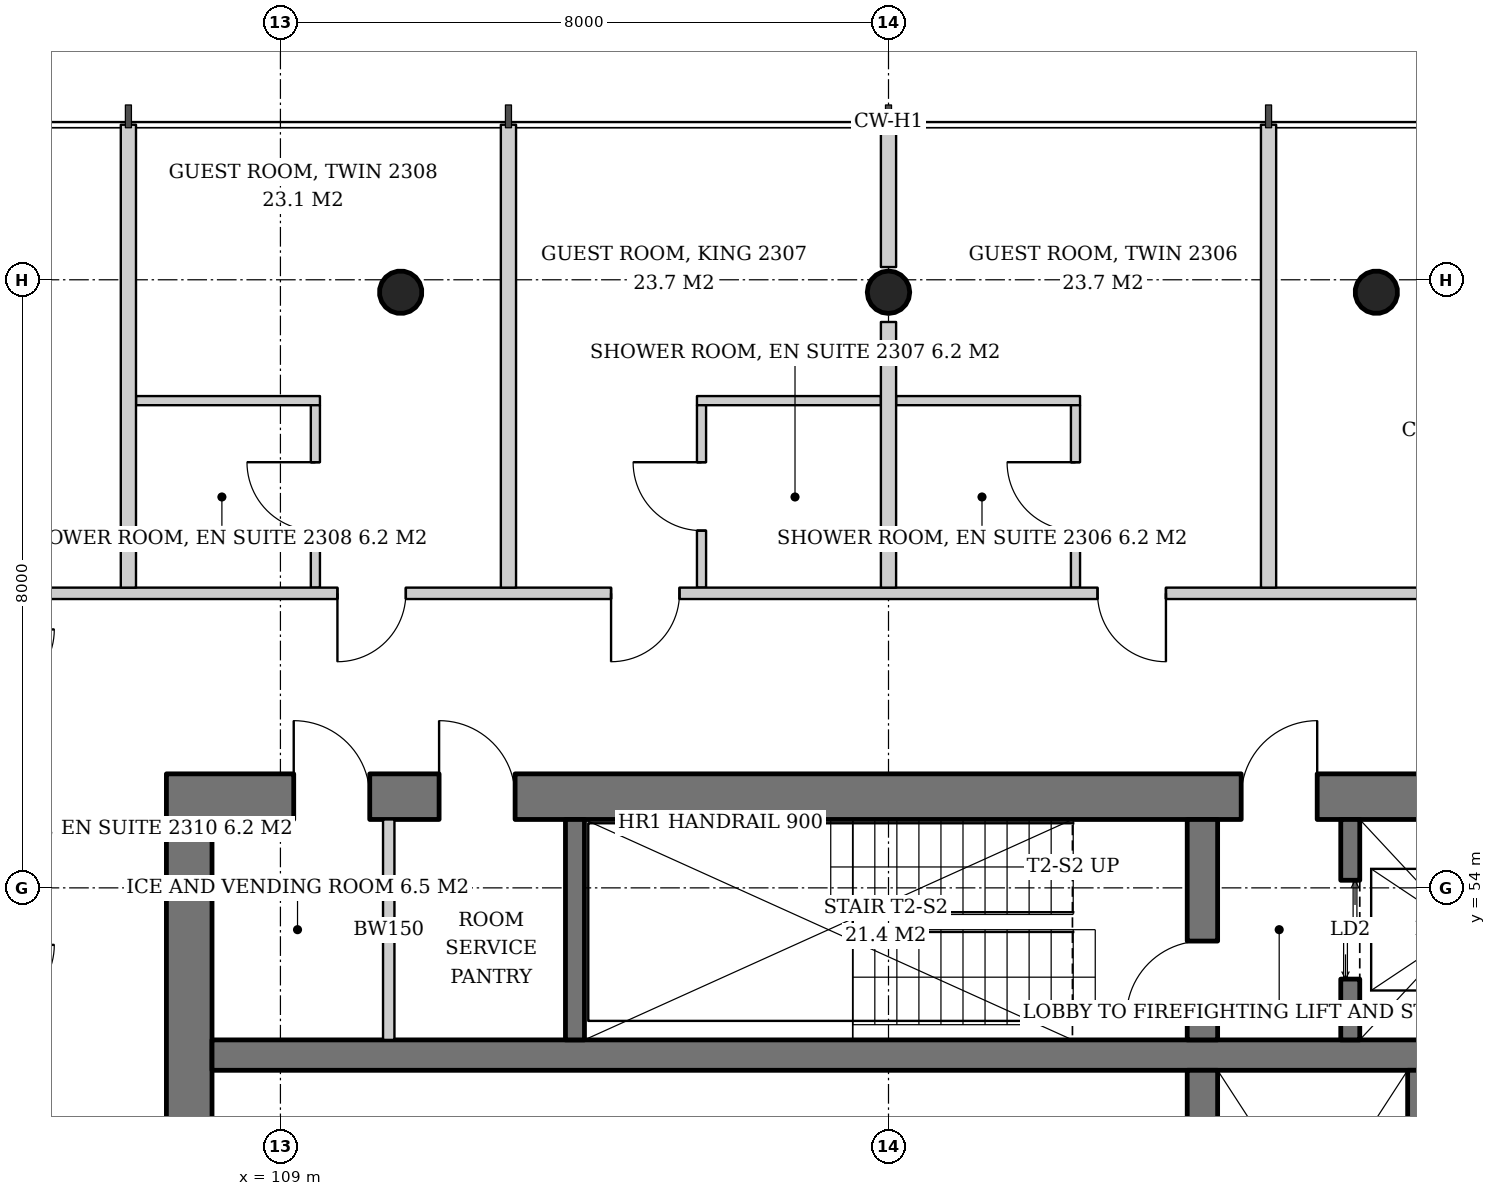
"""IFC4 building model, lengths in metres.
Left out: names, types, materials, properties, quantities, classifications, styles, units other than length and angle.
Written with IfcOpenShell. Run it as: python <this file> out.ifc"""

import sys

from ifc_helpers import new_model, si_unit, direction, frame, frame_2d, origin, origin_2d, place, context, subcontext, project, spatial, rectangle, hollow_circle, extrude, element, fill, save


model = new_model("IFC4")
c1 = context("Model", 3, precision=1e-05, world=origin(), true_north=direction((0.0, 1.0)))
c2 = subcontext(c1, "Body", "Model", "MODEL_VIEW")
j1 = project(units=[si_unit("LENGTHUNIT", "METRE"), si_unit("PLANEANGLEUNIT", "RADIAN")], contexts=[c1])
p1 = place(None, origin())
s1 = spatial("IfcSite", under=j1, at=p1, CompositionType="ELEMENT")
p2 = place(p1, origin())
s2 = spatial("IfcBuilding", under=s1, at=p2, CompositionType="ELEMENT")
p3 = place(p2, frame((0.0, 0.0, 93.2)))
s3 = spatial("IfcBuildingStorey", under=s2, at=p3, CompositionType="ELEMENT", Elevation=93.2)
p4 = place(p3, frame((123.444, 61.888, 0.0), z_axis=(-0.021497706284, -0.043059584825, 0.998841188968), x_axis=(0.894693706707, -0.446680166538, 0.0)))
e1 = element("IfcColumn", 1, at=p4, inside=s3, PredefinedType="COLUMN", context=c2, shape_type="SweptSolid", body=[
    extrude(hollow_circle(Radius=0.28, WallThickness=0.02, at=origin_2d()), origin(), (0.0, 0.0, 1.0), 3.804),
])
p5 = place(p3, frame((117.0, 61.888, 0.0), z_axis=(0.0, -0.043069538298, 0.999072076915), x_axis=(1.0, 0.0, 0.0)))
e2 = element("IfcColumn", 2, at=p5, inside=s3, PredefinedType="COLUMN", context=c2, shape_type="SweptSolid", body=[
    extrude(hollow_circle(Radius=0.28, WallThickness=0.02, at=origin_2d()), origin(), (0.0, 0.0, 1.0), 3.803),
])
p6 = place(p3, frame((110.556, 61.888, 0.0), z_axis=(0.021497706284, -0.043059584825, 0.998841188968), x_axis=(0.894693706707, 0.446680166538, 0.0)))
e3 = element("IfcColumn", 3, at=p6, inside=s3, PredefinedType="COLUMN", context=c2, shape_type="SweptSolid", body=[
    extrude(hollow_circle(Radius=0.28, WallThickness=0.02, at=origin_2d()), origin(), (0.0, 0.0, 1.0), 3.804),
])
p7 = place(p3, frame((107.5, 55.2, 0.0), z_axis=(0.0, 0.0, 1.0), x_axis=(1.0, 0.0, 0.0)))
e4 = element("IfcWall", 4, at=p7, inside=s3, PredefinedType="SHEAR", context=c2, shape_type="SweptSolid", body=[
    extrude(rectangle(XDim=19.0, YDim=0.6, at=frame_2d((9.5, 0.0))), origin(), (0.0, 0.0, 1.0), 3.8),
])
p8 = place(p7, frame((14.14, 0.0, 0.0)))
e5 = element("IfcOpeningElement", 5, at=p8, cuts=e4, PredefinedType="OPENING", context=c2, shape_type="SweptSolid", body=[
    extrude(rectangle(XDim=1.0, YDim=2.1, at=frame_2d((0.5, 1.05))), frame((0.0, 0.31, 0.0), z_axis=(0.0, -1.0, 0.0), x_axis=(1.0, 0.0, 0.0)), (0.0, 0.0, 1.0), 0.62),
])
p9 = place(p7, frame((1.675, 0.0, 0.0)))
e6 = element("IfcOpeningElement", 6, at=p9, cuts=e4, PredefinedType="OPENING", context=c2, shape_type="SweptSolid", body=[
    extrude(rectangle(XDim=1.0, YDim=2.1, at=frame_2d((0.5, 1.05))), frame((0.0, 0.31, 0.0), z_axis=(0.0, -1.0, 0.0), x_axis=(1.0, 0.0, 0.0)), (0.0, 0.0, 1.0), 0.62),
])
p10 = place(p7, frame((3.587, 0.0, 0.0)))
e7 = element("IfcOpeningElement", 7, at=p10, cuts=e4, PredefinedType="OPENING", context=c2, shape_type="SweptSolid", body=[
    extrude(rectangle(XDim=1.0, YDim=2.1, at=frame_2d((0.5, 1.05))), frame((0.0, 0.31, 0.0), z_axis=(0.0, -1.0, 0.0), x_axis=(1.0, 0.0, 0.0)), (0.0, 0.0, 1.0), 0.62),
])
p11 = place(p3, frame((107.8, 37.1, 0.0), z_axis=(0.0, 0.0, 1.0), x_axis=(0.0, 1.0, 0.0)))
e8 = element("IfcWall", 8, at=p11, inside=s3, PredefinedType="SHEAR", context=c2, shape_type="SweptSolid", body=[
    extrude(rectangle(XDim=17.8, YDim=0.6, at=frame_2d((8.9, 0.0))), origin(), (0.0, 0.0, 1.0), 3.8),
])
p12 = place(p11, frame((8.0, 0.0, 0.0)))
e9 = element("IfcOpeningElement", 9, at=p12, cuts=e8, PredefinedType="OPENING", context=c2, shape_type="SweptSolid", body=[
    extrude(rectangle(XDim=1.8, YDim=2.4, at=frame_2d((0.9, 1.2))), frame((0.0, 0.31, 0.0), z_axis=(0.0, -1.0, 0.0), x_axis=(1.0, 0.0, 0.0)), (0.0, 0.0, 1.0), 0.62),
])
p13 = place(p3, frame((108.1, 51.8, 0.0), z_axis=(0.0, 0.0, 1.0), x_axis=(1.0, 0.0, 0.0)))
e10 = element("IfcWall", 10, at=p13, inside=s3, PredefinedType="SHEAR", context=c2, shape_type="SweptSolid", body=[
    extrude(rectangle(XDim=17.8, YDim=0.4, at=frame_2d((8.9, 0.0))), origin(), (0.0, 0.0, 1.0), 3.8),
])
p14 = place(p3, frame((121.13, 40.4, 0.0), z_axis=(0.0, 0.0, 1.0), x_axis=(0.0, 1.0, 0.0)))
e11 = element("IfcWall", 11, at=p14, inside=s3, PredefinedType="SHEAR", context=c2, shape_type="SweptSolid", body=[
    extrude(rectangle(XDim=11.2, YDim=0.4, at=frame_2d((5.6, 0.0))), origin(), (0.0, 0.0, 1.0), 3.8),
])
p15 = place(p3, frame((121.13, 52.0, 0.0), z_axis=(0.0, 0.0, 1.0), x_axis=(0.0, 1.0, 0.0)))
e12 = element("IfcWall", 12, at=p15, inside=s3, PredefinedType="SHEAR", context=c2, shape_type="SweptSolid", body=[
    extrude(rectangle(XDim=2.9, YDim=0.4, at=frame_2d((1.45, 0.0))), origin(), (0.0, 0.0, 1.0), 3.8),
])
p16 = place(p15, frame((0.3, 0.0, 0.0)))
e13 = element("IfcOpeningElement", 13, at=p16, cuts=e12, PredefinedType="OPENING", context=c2, shape_type="SweptSolid", body=[
    extrude(rectangle(XDim=1.0, YDim=2.1, at=frame_2d((0.5, 1.05))), frame((0.0, 0.21, 0.0), z_axis=(0.0, -1.0, 0.0), x_axis=(1.0, 0.0, 0.0)), (0.0, 0.0, 1.0), 0.42),
])
p17 = place(p3, frame((112.875, 52.0, 0.0), z_axis=(0.0, 0.0, 1.0), x_axis=(0.0, 1.0, 0.0)))
e14 = element("IfcWall", 14, at=p17, inside=s3, PredefinedType="SHEAR", context=c2, shape_type="SweptSolid", body=[
    extrude(rectangle(XDim=2.9, YDim=0.25, at=frame_2d((1.45, 0.0))), origin(), (0.0, 0.0, 1.0), 3.8),
])
p18 = place(p3, frame((123.075, 52.0, 0.0), z_axis=(0.0, 0.0, 1.0), x_axis=(0.0, 1.0, 0.0)))
e15 = element("IfcWall", 15, at=p18, inside=s3, PredefinedType="SHEAR", context=c2, shape_type="SweptSolid", body=[
    extrude(rectangle(XDim=2.9, YDim=0.25, at=frame_2d((1.45, 0.0))), origin(), (0.0, 0.0, 1.0), 3.8),
])
p19 = place(p18, frame((0.8, 0.0, 0.0)))
e16 = element("IfcOpeningElement", 16, at=p19, cuts=e15, PredefinedType="OPENING", context=c2, shape_type="SweptSolid", body=[
    extrude(rectangle(XDim=1.3, YDim=2.2, at=frame_2d((0.65, 1.1))), frame((0.0, 0.135, 0.0), z_axis=(0.0, -1.0, 0.0), x_axis=(1.0, 0.0, 0.0)), (0.0, 0.0, 1.0), 0.27),
])
p20 = place(p3, frame((123.955, 47.75, 0.0), z_axis=(0.0, 0.0, 1.0), x_axis=(0.0, 1.0, 0.0)))
e17 = element("IfcWall", 17, at=p20, inside=s3, PredefinedType="SHEAR", context=c2, shape_type="SweptSolid", body=[
    extrude(rectangle(XDim=3.85, YDim=0.25, at=frame_2d((1.925, 0.0))), origin(), (0.0, 0.0, 1.0), 3.8),
])
p21 = place(p3, frame((110.425, 52.0, 0.0), z_axis=(0.0, 0.0, 1.0), x_axis=(0.0, 1.0, 0.0)))
e18 = element("IfcWall", 18, at=p21, inside=s3, PredefinedType="SOLIDWALL", context=c2, shape_type="SweptSolid", body=[
    extrude(rectangle(XDim=2.9, YDim=0.15, at=frame_2d((1.45, 0.0))), origin(), (0.0, 0.0, 1.0), 3.6),
])
p22 = place(p3, frame((119.52, 60.41, 0.0), z_axis=(0.0, 0.0, 1.0), x_axis=(-1.0, 0.0, 0.0)))
e19 = element("IfcWall", 19, at=p22, inside=s3, PredefinedType="PARTITIONING", context=c2, shape_type="SweptSolid", body=[
    extrude(rectangle(XDim=2.42, YDim=0.12, at=frame_2d((1.21, 0.0))), origin(), (0.0, 0.0, 1.0), 3.0),
])
p23 = place(p3, frame((119.46, 57.95, 0.0), z_axis=(0.0, 0.0, 1.0), x_axis=(0.0, 1.0, 0.0)))
e20 = element("IfcWall", 20, at=p23, inside=s3, PredefinedType="PARTITIONING", context=c2, shape_type="SweptSolid", body=[
    extrude(rectangle(XDim=2.4, YDim=0.12, at=frame_2d((1.2, 0.0))), origin(), (0.0, 0.0, 1.0), 3.6),
])
p24 = place(p23, frame((0.75, 0.0, 0.0)))
e21 = element("IfcOpeningElement", 21, at=p24, cuts=e20, PredefinedType="OPENING", context=c2, shape_type="SweptSolid", body=[
    extrude(rectangle(XDim=0.9, YDim=2.1, at=frame_2d((0.45, 1.05))), frame((0.0, 0.07, 0.0), z_axis=(0.0, -1.0, 0.0), x_axis=(1.0, 0.0, 0.0)), (0.0, 0.0, 1.0), 0.14),
])
p25 = place(p3, frame((116.9, 60.41, 0.0), z_axis=(0.0, 0.0, 1.0), x_axis=(-1.0, 0.0, 0.0)))
e22 = element("IfcWall", 22, at=p25, inside=s3, PredefinedType="PARTITIONING", context=c2, shape_type="SweptSolid", body=[
    extrude(rectangle(XDim=2.42, YDim=0.12, at=frame_2d((1.21, 0.0))), origin(), (0.0, 0.0, 1.0), 3.6),
])
p26 = place(p3, frame((114.54, 57.95, 0.0), z_axis=(0.0, 0.0, 1.0), x_axis=(0.0, 1.0, 0.0)))
e23 = element("IfcWall", 23, at=p26, inside=s3, PredefinedType="PARTITIONING", context=c2, shape_type="SweptSolid", body=[
    extrude(rectangle(XDim=2.4, YDim=0.12, at=frame_2d((1.2, 0.0))), origin(), (0.0, 0.0, 1.0), 3.6),
])
p27 = place(p26, frame((0.75, 0.0, 0.0)))
e24 = element("IfcOpeningElement", 24, at=p27, cuts=e23, PredefinedType="OPENING", context=c2, shape_type="SweptSolid", body=[
    extrude(rectangle(XDim=0.9, YDim=2.1, at=frame_2d((0.45, 1.05))), frame((0.0, 0.07, 0.0), z_axis=(0.0, -1.0, 0.0), x_axis=(1.0, 0.0, 0.0)), (0.0, 0.0, 1.0), 0.14),
])
p28 = place(p3, frame((109.52, 60.41, 0.0), z_axis=(0.0, 0.0, 1.0), x_axis=(-1.0, 0.0, 0.0)))
e25 = element("IfcWall", 25, at=p28, inside=s3, PredefinedType="PARTITIONING", context=c2, shape_type="SweptSolid", body=[
    extrude(rectangle(XDim=2.42, YDim=0.12, at=frame_2d((1.21, 0.0))), origin(), (0.0, 0.0, 1.0), 3.0),
])
p29 = place(p3, frame((109.46, 57.95, 0.0), z_axis=(0.0, 0.0, 1.0), x_axis=(0.0, 1.0, 0.0)))
e26 = element("IfcWall", 26, at=p29, inside=s3, PredefinedType="PARTITIONING", context=c2, shape_type="SweptSolid", body=[
    extrude(rectangle(XDim=2.4, YDim=0.12, at=frame_2d((1.2, 0.0))), origin(), (0.0, 0.0, 1.0), 3.0),
])
p30 = place(p29, frame((0.75, 0.0, 0.0)))
e27 = element("IfcOpeningElement", 27, at=p30, cuts=e26, PredefinedType="OPENING", context=c2, shape_type="SweptSolid", body=[
    extrude(rectangle(XDim=0.9, YDim=2.1, at=frame_2d((0.45, 1.05))), frame((0.0, 0.07, 0.0), z_axis=(0.0, -1.0, 0.0), x_axis=(1.0, 0.0, 0.0)), (0.0, 0.0, 1.0), 0.14),
])
p31 = place(p3, frame((128.791, 57.875, 0.0), z_axis=(0.0, 0.0, 1.0), x_axis=(-1.0, 0.0, 0.0)))
e28 = element("IfcWall", 28, at=p31, inside=s3, PredefinedType="PARTITIONING", context=c2, shape_type="SweptSolid", body=[
    extrude(rectangle(XDim=23.583, YDim=0.15, at=frame_2d((11.791, 0.0))), origin(), (0.0, 0.0, 1.0), 2.9),
])
p32 = place(p31, frame((0.391, 0.0, 0.0)))
e29 = element("IfcOpeningElement", 29, at=p32, cuts=e28, PredefinedType="OPENING", context=c2, shape_type="SweptSolid", body=[
    extrude(rectangle(XDim=0.9, YDim=2.1, at=frame_2d((0.45, 1.05))), frame((0.0, 0.085, 0.0), z_axis=(0.0, -1.0, 0.0), x_axis=(1.0, 0.0, 0.0)), (0.0, 0.0, 1.0), 0.17),
])
p33 = place(p31, frame((8.141, 0.0, 0.0)))
e30 = element("IfcOpeningElement", 30, at=p33, cuts=e28, PredefinedType="OPENING", context=c2, shape_type="SweptSolid", body=[
    extrude(rectangle(XDim=0.9, YDim=2.1, at=frame_2d((0.45, 1.05))), frame((0.0, 0.085, 0.0), z_axis=(0.0, -1.0, 0.0), x_axis=(1.0, 0.0, 0.0)), (0.0, 0.0, 1.0), 0.17),
])
p34 = place(p31, frame((14.541, 0.0, 0.0)))
e31 = element("IfcOpeningElement", 31, at=p34, cuts=e28, PredefinedType="OPENING", context=c2, shape_type="SweptSolid", body=[
    extrude(rectangle(XDim=0.9, YDim=2.1, at=frame_2d((0.45, 1.05))), frame((0.0, 0.085, 0.0), z_axis=(0.0, -1.0, 0.0), x_axis=(1.0, 0.0, 0.0)), (0.0, 0.0, 1.0), 0.17),
])
p35 = place(p31, frame((18.141, 0.0, 0.0)))
e32 = element("IfcOpeningElement", 32, at=p35, cuts=e28, PredefinedType="OPENING", context=c2, shape_type="SweptSolid", body=[
    extrude(rectangle(XDim=0.9, YDim=2.1, at=frame_2d((0.45, 1.05))), frame((0.0, 0.085, 0.0), z_axis=(0.0, -1.0, 0.0), x_axis=(1.0, 0.0, 0.0)), (0.0, 0.0, 1.0), 0.17),
])
p36 = place(p3, frame((122.0, 57.95, 0.0), z_axis=(0.0, 0.0, 1.0), x_axis=(0.0, 1.0, 0.0)))
e33 = element("IfcWall", 33, at=p36, inside=s3, PredefinedType="PARTITIONING", context=c2, shape_type="SweptSolid", body=[
    extrude(rectangle(XDim=6.09, YDim=0.2, at=frame_2d((3.045, 0.0))), origin(), (0.0, 0.0, 1.0), 3.0),
])
p37 = place(p3, frame((117.0, 57.95, 0.0), z_axis=(0.0, 0.0, 1.0), x_axis=(0.0, 1.0, 0.0)))
e34 = element("IfcWall", 34, at=p37, inside=s3, PredefinedType="PARTITIONING", context=c2, shape_type="SweptSolid", body=[
    extrude(rectangle(XDim=3.495, YDim=0.2, at=frame_2d((1.747, 0.0))), origin(), (0.0, 0.0, 1.0), 3.6),
])
p38 = place(p3, frame((117.0, 62.167, 0.0), z_axis=(0.0, 0.0, 1.0), x_axis=(0.0, 1.0, 0.0)))
e35 = element("IfcWall", 35, at=p38, inside=s3, PredefinedType="PARTITIONING", context=c2, shape_type="SweptSolid", body=[
    extrude(rectangle(XDim=1.873, YDim=0.2, at=frame_2d((0.936, 0.0))), origin(), (0.0, 0.0, 1.0), 3.6),
])
for number, where, z_axis, x_axis in (
    (36, (112.0, 57.95, 0.0), (0.0, 0.0, 1.0), (0.0, 1.0, 0.0)),
    (37, (107.0, 57.95, 0.0), (0.0, 0.0, 1.0), (0.0, 1.0, 0.0)),
):
    element("IfcWall", number, at=place(p3, frame(where, z_axis=z_axis, x_axis=x_axis)), inside=s3, PredefinedType="PARTITIONING", context=c2, shape_type="SweptSolid", body=[
        extrude(rectangle(XDim=6.09, YDim=0.2, at=frame_2d((3.045, 0.0))), origin(), (0.0, 0.0, 1.0), 3.2),
    ])
p39 = place(p19, origin())
e38 = element("IfcDoor", 38, at=p39, inside=s3, OperationType="DOUBLE_DOOR_SLIDING", PredefinedType="DOOR", context=c2, shape_type="SweptSolid", body=[
    extrude(rectangle(XDim=1.3, YDim=2.2, at=frame_2d((0.65, 1.1))), frame((0.0, 0.025, 0.0), z_axis=(0.0, -1.0, 0.0), x_axis=(1.0, 0.0, 0.0)), (0.0, 0.0, 1.0), 0.05),
])
fill(e16, e38)
p40 = place(p16, origin())
e39 = element("IfcDoor", 39, at=p40, inside=s3, OperationType="SINGLE_SWING_LEFT", PredefinedType="DOOR", context=c2, shape_type="SweptSolid", body=[
    extrude(rectangle(XDim=1.0, YDim=2.1, at=frame_2d((0.5, 1.05))), frame((0.0, 0.025, 0.0), z_axis=(0.0, -1.0, 0.0), x_axis=(1.0, 0.0, 0.0)), (0.0, 0.0, 1.0), 0.05),
])
fill(e13, e39)
p41 = place(p8, origin())
e40 = element("IfcDoor", 40, at=p41, inside=s3, OperationType="SINGLE_SWING_RIGHT", PredefinedType="DOOR", context=c2, shape_type="SweptSolid", body=[
    extrude(rectangle(XDim=1.0, YDim=2.1, at=frame_2d((0.5, 1.05))), frame((0.0, 0.025, 0.0), z_axis=(0.0, -1.0, 0.0), x_axis=(1.0, 0.0, 0.0)), (0.0, 0.0, 1.0), 0.05),
])
fill(e5, e40)
p42 = place(p9, origin())
e41 = element("IfcDoor", 41, at=p42, inside=s3, OperationType="SINGLE_SWING_LEFT", PredefinedType="DOOR", context=c2, shape_type="SweptSolid", body=[
    extrude(rectangle(XDim=1.0, YDim=2.1, at=frame_2d((0.5, 1.05))), frame((0.0, -0.24, 0.0), z_axis=(0.0, -1.0, 0.0), x_axis=(1.0, 0.0, 0.0)), (0.0, 0.0, 1.0), 0.05),
])
fill(e6, e41)
p43 = place(p10, origin())
e42 = element("IfcDoor", 42, at=p43, inside=s3, OperationType="SINGLE_SWING_LEFT", PredefinedType="DOOR", context=c2, shape_type="SweptSolid", body=[
    extrude(rectangle(XDim=1.0, YDim=2.1, at=frame_2d((0.5, 1.05))), frame((0.0, -0.24, 0.0), z_axis=(0.0, -1.0, 0.0), x_axis=(1.0, 0.0, 0.0)), (0.0, 0.0, 1.0), 0.05),
])
fill(e7, e42)
p44 = place(p24, origin())
e43 = element("IfcDoor", 43, at=p44, inside=s3, OperationType="SINGLE_SWING_RIGHT", PredefinedType="DOOR", context=c2, shape_type="SweptSolid", body=[
    extrude(rectangle(XDim=0.9, YDim=2.1, at=frame_2d((0.45, 1.05))), frame((0.0, 0.025, 0.0), z_axis=(0.0, -1.0, 0.0), x_axis=(1.0, 0.0, 0.0)), (0.0, 0.0, 1.0), 0.05),
])
fill(e21, e43)
p45 = place(p27, origin())
e44 = element("IfcDoor", 44, at=p45, inside=s3, OperationType="SINGLE_SWING_RIGHT", PredefinedType="DOOR", context=c2, shape_type="SweptSolid", body=[
    extrude(rectangle(XDim=0.9, YDim=2.1, at=frame_2d((0.45, 1.05))), frame((0.0, 0.025, 0.0), z_axis=(0.0, -1.0, 0.0), x_axis=(1.0, 0.0, 0.0)), (0.0, 0.0, 1.0), 0.05),
])
fill(e24, e44)
p46 = place(p30, origin())
e45 = element("IfcDoor", 45, at=p46, inside=s3, OperationType="SINGLE_SWING_RIGHT", PredefinedType="DOOR", context=c2, shape_type="SweptSolid", body=[
    extrude(rectangle(XDim=0.9, YDim=2.1, at=frame_2d((0.45, 1.05))), frame((0.0, 0.025, 0.0), z_axis=(0.0, -1.0, 0.0), x_axis=(1.0, 0.0, 0.0)), (0.0, 0.0, 1.0), 0.05),
])
fill(e27, e45)
p47 = place(p33, origin())
e46 = element("IfcDoor", 46, at=p47, inside=s3, OperationType="SINGLE_SWING_LEFT", PredefinedType="DOOR", context=c2, shape_type="SweptSolid", body=[
    extrude(rectangle(XDim=0.9, YDim=2.1, at=frame_2d((0.45, 1.05))), frame((0.0, 0.025, 0.0), z_axis=(0.0, -1.0, 0.0), x_axis=(1.0, 0.0, 0.0)), (0.0, 0.0, 1.0), 0.05),
])
fill(e30, e46)
p48 = place(p34, origin())
e47 = element("IfcDoor", 47, at=p48, inside=s3, OperationType="SINGLE_SWING_RIGHT", PredefinedType="DOOR", context=c2, shape_type="SweptSolid", body=[
    extrude(rectangle(XDim=0.9, YDim=2.1, at=frame_2d((0.45, 1.05))), frame((0.0, 0.025, 0.0), z_axis=(0.0, -1.0, 0.0), x_axis=(1.0, 0.0, 0.0)), (0.0, 0.0, 1.0), 0.05),
])
fill(e31, e47)
p49 = place(p35, origin())
e48 = element("IfcDoor", 48, at=p49, inside=s3, OperationType="SINGLE_SWING_RIGHT", PredefinedType="DOOR", context=c2, shape_type="SweptSolid", body=[
    extrude(rectangle(XDim=0.9, YDim=2.1, at=frame_2d((0.45, 1.05))), frame((0.0, 0.025, 0.0), z_axis=(0.0, -1.0, 0.0), x_axis=(1.0, 0.0, 0.0)), (0.0, 0.0, 1.0), 0.05),
])
fill(e32, e48)
save(model, sys.argv[1])
